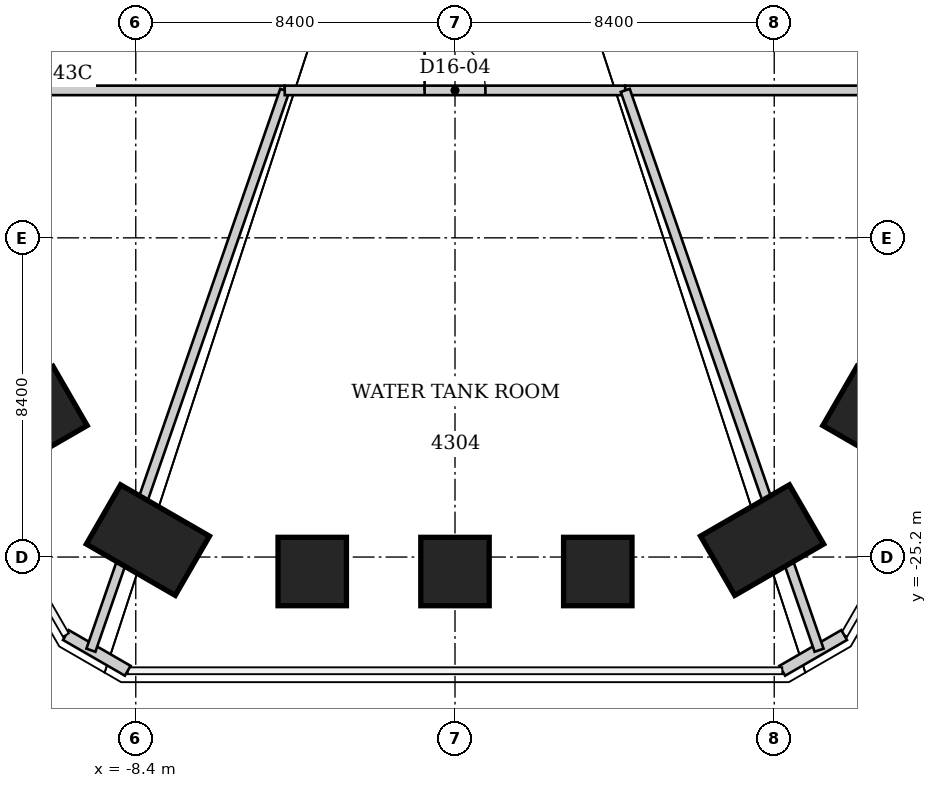
"""IFC4 building model, lengths in metres.
Left out: names, types, materials, properties, quantities, classifications, styles, units other than length and angle.
Written with IfcOpenShell. Run it as: python <this file> out.ifc"""

import sys

from ifc_helpers import new_model, si_unit, direction, frame, frame_2d, origin, origin_2d, place, context, subcontext, project, spatial, rectangle, extrude, element, fill, save


model = new_model("IFC4")
c1 = context("Model", 3, precision=1e-05, world=origin(), true_north=direction((0.0, 1.0)))
c2 = subcontext(c1, "Body", "Model", "MODEL_VIEW")
j1 = project(units=[si_unit("LENGTHUNIT", "METRE"), si_unit("PLANEANGLEUNIT", "RADIAN")], contexts=[c1])
p1 = place(None, origin())
s1 = spatial("IfcSite", under=j1, at=p1, CompositionType="ELEMENT")
p2 = place(p1, origin())
s2 = spatial("IfcBuilding", under=s1, at=p2, CompositionType="ELEMENT")
p3 = place(p2, frame((0.0, 0.0, 172.8)))
s3 = spatial("IfcBuildingStorey", under=s2, at=p3, CompositionType="ELEMENT", Elevation=172.8)
p4 = place(p3, frame((10.909, -21.41, 0.0), z_axis=(-0.025565164863, 0.050169921029, 0.998413442102), x_axis=(0.865809936537, -0.498141748039, 0.047201193355)))
e1 = element("IfcColumn", 1, at=p4, inside=s3, PredefinedType="COLUMN", context=c2, shape_type="SweptSolid", body=[
    extrude(rectangle(XDim=1.8, YDim=1.8, at=origin_2d()), origin(), (0.0, 0.0, 1.0), 5.338),
])
p5 = place(p3, frame((8.08, -24.754, 0.0), z_axis=(-0.019069466011, 0.058488841794, 0.99810591164), x_axis=(0.499451722979, -0.864248506382, 0.060187171637)))
e2 = element("IfcColumn", 2, at=p5, inside=s3, PredefinedType="COLUMN", context=c2, shape_type="SweptSolid", body=[
    extrude(rectangle(XDim=1.8, YDim=2.7, at=origin_2d()), origin(), (0.0, 0.0, 1.0), 5.339),
])
p6 = place(p3, frame((3.757, -25.581, 0.0), z_axis=(-0.008672625166, 0.059019496524, 0.9982191566), x_axis=(-0.000427916009, -0.998256826602, 0.059018005979)))
e3 = element("IfcColumn", 3, at=p6, inside=s3, PredefinedType="COLUMN", context=c2, shape_type="SweptSolid", body=[
    extrude(rectangle(XDim=1.8, YDim=1.8, at=origin_2d()), origin(), (0.0, 0.0, 1.0), 5.349),
])
p7 = place(p3, frame((0.0, -25.581, 0.0), z_axis=(0.0, 0.05902662205, 0.99825640889), x_axis=(0.0, -0.99825640889, 0.05902662205)))
e4 = element("IfcColumn", 4, at=p7, inside=s3, PredefinedType="COLUMN", context=c2, shape_type="SweptSolid", body=[
    extrude(rectangle(XDim=1.8, YDim=1.8, at=origin_2d()), origin(), (0.0, 0.0, 1.0), 5.356),
])
p8 = place(p3, frame((-3.757, -25.581, 0.0), z_axis=(0.008672625166, 0.059019496524, 0.9982191566), x_axis=(0.000427916009, -0.998256826602, 0.059018005979)))
e5 = element("IfcColumn", 5, at=p8, inside=s3, PredefinedType="COLUMN", context=c2, shape_type="SweptSolid", body=[
    extrude(rectangle(XDim=1.8, YDim=1.8, at=origin_2d()), origin(), (0.0, 0.0, 1.0), 5.349),
])
p9 = place(p3, frame((-8.08, -24.754, 0.0), z_axis=(0.019069466011, 0.058488841794, 0.99810591164), x_axis=(-0.499451722979, -0.864248506382, 0.060187171637)))
e6 = element("IfcColumn", 6, at=p9, inside=s3, PredefinedType="COLUMN", context=c2, shape_type="SweptSolid", body=[
    extrude(rectangle(XDim=1.8, YDim=2.7, at=origin_2d()), origin(), (0.0, 0.0, 1.0), 5.339),
])
p10 = place(p3, frame((-10.909, -21.41, 0.0), z_axis=(0.025565164863, 0.050169921029, 0.998413442102), x_axis=(-0.865809936537, -0.498141748039, 0.047201193355)))
e7 = element("IfcColumn", 7, at=p10, inside=s3, PredefinedType="COLUMN", context=c2, shape_type="SweptSolid", body=[
    extrude(rectangle(XDim=1.8, YDim=1.8, at=origin_2d()), origin(), (0.0, 0.0, 1.0), 5.338),
])
for number, where, z_axis, x_axis in (
    (8, (10.24, -27.252, 0.0), (0.0, 0.0, 1.0), (-0.866, -0.5, 0.0)),
    (9, (-8.611, -28.192, 0.0), (0.0, 0.0, 1.0), (-0.866, 0.5, 0.0)),
):
    element("IfcWall", number, at=place(p3, frame(where, z_axis=z_axis, x_axis=x_axis)), inside=s3, PredefinedType="SOLIDWALL", context=c2, shape_type="SweptSolid", body=[
        extrude(rectangle(XDim=1.88, YDim=0.3, at=frame_2d((0.94, 0.0))), origin(), (0.0, 0.0, 1.0), 5.24),
    ])
p11 = place(p3, frame((-11.47, -12.92, 0.0), z_axis=(0.0, 0.0, 1.0), x_axis=(1.0, 0.0, 0.0)))
e10 = element("IfcWall", 10, at=p11, inside=s3, PredefinedType="PARTITIONING", context=c2, shape_type="SweptSolid", body=[
    extrude(rectangle(XDim=6.99, YDim=0.25, at=frame_2d((3.495, 0.0))), origin(), (0.0, 0.0, 1.0), 5.24),
])
p12 = place(p3, frame((-9.58, -27.652, 0.0), z_axis=(0.0, 0.0, 1.0), x_axis=(0.327148752999, 0.944972853267, 0.0)))
e11 = element("IfcWall", 11, at=p12, inside=s3, PredefinedType="PARTITIONING", context=c2, shape_type="SweptSolid", body=[
    extrude(rectangle(XDim=15.59, YDim=0.25, at=frame_2d((7.795, 0.0))), origin(), (0.0, 0.0, 1.0), 5.2),
])
p13 = place(p3, frame((-4.48, -12.92, 0.0), z_axis=(0.0, 0.0, 1.0), x_axis=(1.0, 0.0, 0.0)))
e12 = element("IfcWall", 12, at=p13, inside=s3, PredefinedType="PARTITIONING", context=c2, shape_type="SweptSolid", body=[
    extrude(rectangle(XDim=8.96, YDim=0.25, at=frame_2d((4.48, 0.0))), origin(), (0.0, 0.0, 1.0), 5.24),
])
p14 = place(p13, frame((3.68, 0.0, 0.0)))
e13 = element("IfcOpeningElement", 13, at=p14, cuts=e12, PredefinedType="OPENING", context=c2, shape_type="SweptSolid", body=[
    extrude(rectangle(XDim=1.6, YDim=2.4, at=frame_2d((0.8, 1.2))), frame((0.0, 0.125, 0.0), z_axis=(0.0, -1.0, 0.0), x_axis=(1.0, 0.0, 0.0)), (0.0, 0.0, 1.0), 0.25),
])
p15 = place(p3, frame((4.48, -12.92, 0.0), z_axis=(0.0, 0.0, 1.0), x_axis=(1.0, 0.0, 0.0)))
e14 = element("IfcWall", 14, at=p15, inside=s3, PredefinedType="PARTITIONING", context=c2, shape_type="SweptSolid", body=[
    extrude(rectangle(XDim=6.99, YDim=0.25, at=frame_2d((3.495, 0.0))), origin(), (0.0, 0.0, 1.0), 5.24),
])
p16 = place(p3, frame((9.58, -27.652, 0.0), z_axis=(0.0, 0.0, 1.0), x_axis=(-0.327148752999, 0.944972853267, 0.0)))
e15 = element("IfcWall", 15, at=p16, inside=s3, PredefinedType="PARTITIONING", context=c2, shape_type="SweptSolid", body=[
    extrude(rectangle(XDim=15.59, YDim=0.25, at=frame_2d((7.795, 0.0))), origin(), (0.0, 0.0, 1.0), 5.2),
])
p17 = place(p14, origin())
e16 = element("IfcDoor", 16, at=p17, inside=s3, OperationType="DOUBLE_DOOR_SINGLE_SWING", PredefinedType="DOOR", context=c2, shape_type="SweptSolid", body=[
    extrude(rectangle(XDim=1.6, YDim=2.4, at=frame_2d((0.8, 1.2))), frame((0.0, 0.025, 0.0), z_axis=(0.0, -1.0, 0.0), x_axis=(1.0, 0.0, 0.0)), (0.0, 0.0, 1.0), 0.05),
])
fill(e13, e16)
save(model, sys.argv[1])
